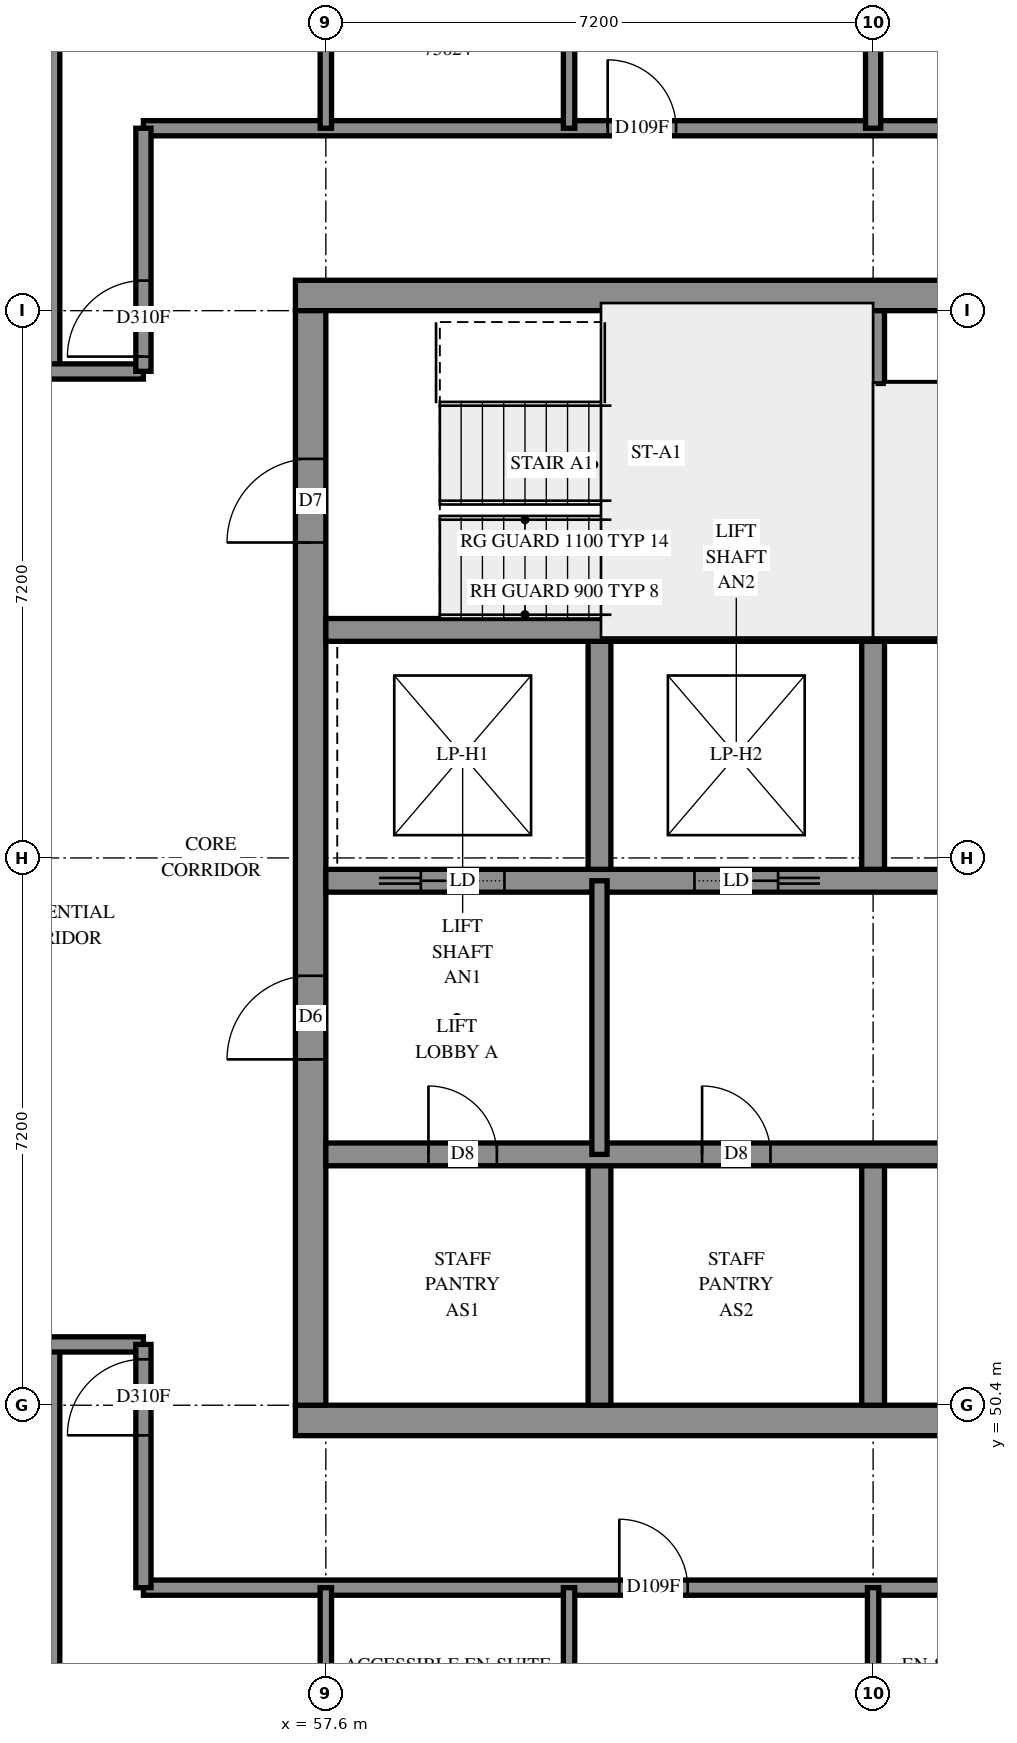
"""IFC4 building model, lengths in metres.
Left out: names, types, materials, properties, quantities, classifications, styles, units other than length and angle.
Written with IfcOpenShell. Run it as: python <this file> out.ifc"""

import sys

from ifc_helpers import new_model, si_unit, direction, frame, frame_2d, origin, place, context, subcontext, project, spatial, rectangle, extrude, element, fill, save


model = new_model("IFC4")
c1 = context("Model", 3, precision=1e-05, world=origin(), true_north=direction((0.0, 1.0)))
c2 = subcontext(c1, "Body", "Model", "MODEL_VIEW")
j1 = project(units=[si_unit("LENGTHUNIT", "METRE"), si_unit("PLANEANGLEUNIT", "RADIAN")], contexts=[c1])
p1 = place(None, origin())
s1 = spatial("IfcSite", under=j1, at=p1, CompositionType="ELEMENT")
p2 = place(p1, origin())
s2 = spatial("IfcBuilding", under=s1, at=p2, CompositionType="ELEMENT")
p3 = place(p2, frame((0.0, 0.0, 274.4)))
s3 = spatial("IfcBuildingStorey", under=s2, at=p3, CompositionType="ELEMENT", Elevation=274.4)
p4 = place(p3, frame((57.2, 50.2, -0.3), z_axis=(0.0, 0.0, 1.0), x_axis=(1.0, 0.0, 0.0)))
e1 = element("IfcWall", 1, at=p4, inside=s3, PredefinedType="SHEAR", context=c2, shape_type="SweptSolid", body=[
    extrude(rectangle(XDim=15.2, YDim=0.4, at=frame_2d((7.6, 0.0))), origin(), (0.0, 0.0, 1.0), 2.7),
])
p5 = place(p3, frame((57.2, 65.0, -0.3), z_axis=(0.0, 0.0, 1.0), x_axis=(1.0, 0.0, 0.0)))
e2 = element("IfcWall", 2, at=p5, inside=s3, PredefinedType="SHEAR", context=c2, shape_type="SweptSolid", body=[
    extrude(rectangle(XDim=15.2, YDim=0.4, at=frame_2d((7.6, 0.0))), origin(), (0.0, 0.0, 1.0), 2.7),
])
p6 = place(p5, frame((10.4, 0.0, 0.3)))
e3 = element("IfcOpeningElement", 3, at=p6, cuts=e2, PredefinedType="OPENING", context=c2, shape_type="SweptSolid", body=[
    extrude(rectangle(XDim=0.8, YDim=2.1, at=frame_2d((0.4, 1.05))), frame((0.0, 0.21, 0.0), z_axis=(0.0, -1.0, 0.0), x_axis=(1.0, 0.0, 0.0)), (0.0, 0.0, 1.0), 0.42),
])
p7 = place(p3, frame((57.4, 50.4, -0.3), z_axis=(0.0, 0.0, 1.0), x_axis=(0.0, 1.0, 0.0)))
e4 = element("IfcWall", 4, at=p7, inside=s3, PredefinedType="SHEAR", context=c2, shape_type="SweptSolid", body=[
    extrude(rectangle(XDim=14.4, YDim=0.4, at=frame_2d((7.2, 0.0))), origin(), (0.0, 0.0, 1.0), 2.7),
])
p8 = place(p7, frame((4.55, 0.0, 0.3)))
e5 = element("IfcOpeningElement", 5, at=p8, cuts=e4, PredefinedType="OPENING", context=c2, shape_type="SweptSolid", body=[
    extrude(rectangle(XDim=1.1, YDim=2.1, at=frame_2d((0.55, 1.05))), frame((0.0, 0.21, 0.0), z_axis=(0.0, -1.0, 0.0), x_axis=(1.0, 0.0, 0.0)), (0.0, 0.0, 1.0), 0.42),
])
p9 = place(p7, frame((11.35, 0.0, 0.3)))
e6 = element("IfcOpeningElement", 6, at=p9, cuts=e4, PredefinedType="OPENING", context=c2, shape_type="SweptSolid", body=[
    extrude(rectangle(XDim=1.1, YDim=2.1, at=frame_2d((0.55, 1.05))), frame((0.0, 0.21, 0.0), z_axis=(0.0, -1.0, 0.0), x_axis=(1.0, 0.0, 0.0)), (0.0, 0.0, 1.0), 0.42),
])
for number, where, z_axis, x_axis in (
    (7, (61.2, 50.4, 0.0), (0.0, 0.0, 1.0), (0.0, 1.0, 0.0)),
    (8, (61.2, 57.3, 0.0), (0.0, 0.0, 1.0), (0.0, 1.0, 0.0)),
    (9, (64.8, 50.4, 0.0), (0.0, 0.0, 1.0), (0.0, 1.0, 0.0)),
    (10, (64.8, 57.3, 0.0), (0.0, 0.0, 1.0), (0.0, 1.0, 0.0)),
):
    element("IfcWall", number, at=place(p3, frame(where, z_axis=z_axis, x_axis=x_axis)), inside=s3, PredefinedType="SOLIDWALL", context=c2, shape_type="SweptSolid", body=[
        extrude(rectangle(XDim=3.3, YDim=0.3, at=frame_2d((1.65, 0.0))), origin(), (0.0, 0.0, 1.0), 3.1),
    ])
p10 = place(p3, frame((57.6, 53.7, 0.0), z_axis=(0.0, 0.0, 1.0), x_axis=(1.0, 0.0, 0.0)))
e11 = element("IfcWall", 11, at=p10, inside=s3, PredefinedType="SOLIDWALL", context=c2, shape_type="SweptSolid", body=[
    extrude(rectangle(XDim=14.4, YDim=0.3, at=frame_2d((7.2, 0.0))), origin(), (0.0, 0.0, 1.0), 3.1),
])
p11 = place(p10, frame((1.35, 0.0, 0.0)))
e12 = element("IfcOpeningElement", 12, at=p11, cuts=e11, PredefinedType="OPENING", context=c2, shape_type="SweptSolid", body=[
    extrude(rectangle(XDim=0.9, YDim=2.1, at=frame_2d((0.45, 1.05))), frame((0.0, 0.16, 0.0), z_axis=(0.0, -1.0, 0.0), x_axis=(1.0, 0.0, 0.0)), (0.0, 0.0, 1.0), 0.32),
])
p12 = place(p10, frame((4.95, 0.0, 0.0)))
e13 = element("IfcOpeningElement", 13, at=p12, cuts=e11, PredefinedType="OPENING", context=c2, shape_type="SweptSolid", body=[
    extrude(rectangle(XDim=0.9, YDim=2.1, at=frame_2d((0.45, 1.05))), frame((0.0, 0.16, 0.0), z_axis=(0.0, -1.0, 0.0), x_axis=(1.0, 0.0, 0.0)), (0.0, 0.0, 1.0), 0.32),
])
p13 = place(p10, frame((8.55, 0.0, 0.0)))
e14 = element("IfcOpeningElement", 14, at=p13, cuts=e11, PredefinedType="OPENING", context=c2, shape_type="SweptSolid", body=[
    extrude(rectangle(XDim=0.9, YDim=2.1, at=frame_2d((0.45, 1.05))), frame((0.0, 0.16, 0.0), z_axis=(0.0, -1.0, 0.0), x_axis=(1.0, 0.0, 0.0)), (0.0, 0.0, 1.0), 0.32),
])
p14 = place(p10, frame((12.05, 0.0, 0.0)))
e15 = element("IfcOpeningElement", 15, at=p14, cuts=e11, PredefinedType="OPENING", context=c2, shape_type="SweptSolid", body=[
    extrude(rectangle(XDim=1.1, YDim=2.1, at=frame_2d((0.55, 1.05))), frame((0.0, 0.16, 0.0), z_axis=(0.0, -1.0, 0.0), x_axis=(1.0, 0.0, 0.0)), (0.0, 0.0, 1.0), 0.32),
])
p15 = place(p3, frame((57.6, 57.3, 0.0), z_axis=(0.0, 0.0, 1.0), x_axis=(1.0, 0.0, 0.0)))
e16 = element("IfcWall", 16, at=p15, inside=s3, PredefinedType="SOLIDWALL", context=c2, shape_type="SweptSolid", body=[
    extrude(rectangle(XDim=14.4, YDim=0.3, at=frame_2d((7.2, 0.0))), origin(), (0.0, 0.0, 1.0), 3.1),
])
p16 = place(p15, frame((8.55, 0.0, 0.0)))
e17 = element("IfcOpeningElement", 17, at=p16, cuts=e16, PredefinedType="OPENING", context=c2, shape_type="SweptSolid", body=[
    extrude(rectangle(XDim=0.9, YDim=2.1, at=frame_2d((0.45, 1.05))), frame((0.0, 0.16, 0.0), z_axis=(0.0, -1.0, 0.0), x_axis=(1.0, 0.0, 0.0)), (0.0, 0.0, 1.0), 0.32),
])
p17 = place(p15, frame((1.25, 0.0, 0.0)))
e18 = element("IfcOpeningElement", 18, at=p17, cuts=e16, PredefinedType="OPENING", context=c2, shape_type="SweptSolid", body=[
    extrude(rectangle(XDim=1.1, YDim=2.1, at=frame_2d((0.55, 1.05))), frame((0.0, 0.16, 0.0), z_axis=(0.0, -1.0, 0.0), x_axis=(1.0, 0.0, 0.0)), (0.0, 0.0, 1.0), 0.32),
])
p18 = place(p15, frame((4.85, 0.0, 0.0)))
e19 = element("IfcOpeningElement", 19, at=p18, cuts=e16, PredefinedType="OPENING", context=c2, shape_type="SweptSolid", body=[
    extrude(rectangle(XDim=1.1, YDim=2.1, at=frame_2d((0.55, 1.05))), frame((0.0, 0.16, 0.0), z_axis=(0.0, -1.0, 0.0), x_axis=(1.0, 0.0, 0.0)), (0.0, 0.0, 1.0), 0.32),
])
p19 = place(p15, frame((12.05, 0.0, 0.0)))
e20 = element("IfcOpeningElement", 20, at=p19, cuts=e16, PredefinedType="OPENING", context=c2, shape_type="SweptSolid", body=[
    extrude(rectangle(XDim=1.1, YDim=2.1, at=frame_2d((0.55, 1.05))), frame((0.0, 0.16, 0.0), z_axis=(0.0, -1.0, 0.0), x_axis=(1.0, 0.0, 0.0)), (0.0, 0.0, 1.0), 0.32),
])
for number, where, z_axis, x_axis in (
    (21, (57.6, 60.6, 0.0), (0.0, 0.0, 1.0), (1.0, 0.0, 0.0)),
    (22, (64.8, 60.6, 0.0), (0.0, 0.0, 1.0), (1.0, 0.0, 0.0)),
):
    element("IfcWall", number, at=place(p3, frame(where, z_axis=z_axis, x_axis=x_axis)), inside=s3, PredefinedType="SOLIDWALL", context=c2, shape_type="SweptSolid", body=[
        extrude(rectangle(XDim=7.2, YDim=0.3, at=frame_2d((3.6, 0.0))), origin(), (0.0, 0.0, 1.0), 3.1),
    ])
p20 = place(p3, frame((64.8, 60.6, 0.0), z_axis=(0.0, 0.0, 1.0), x_axis=(0.0, 1.0, 0.0)))
e23 = element("IfcWall", 23, at=p20, inside=s3, PredefinedType="SOLIDWALL", context=c2, shape_type="SweptSolid", body=[
    extrude(rectangle(XDim=4.2, YDim=0.3, at=frame_2d((2.1, 0.0))), origin(), (0.0, 0.0, 1.0), 3.1),
])
p21 = place(p3, frame((64.95, 63.78, 0.0), z_axis=(0.0, 0.0, 1.0), x_axis=(1.0, 0.0, 0.0)))
e24 = element("IfcWall", 24, at=p21, inside=s3, PredefinedType="PARTITIONING", context=c2, shape_type="SweptSolid", body=[
    extrude(rectangle(XDim=6.25, YDim=0.15, at=frame_2d((3.125, 0.0))), origin(), (0.0, 0.0, 1.0), 3.1),
])
p22 = place(p3, frame((61.2, 53.7, 0.0), z_axis=(0.0, 0.0, 1.0), x_axis=(0.0, 1.0, 0.0)))
e25 = element("IfcWall", 25, at=p22, inside=s3, PredefinedType="PARTITIONING", context=c2, shape_type="SweptSolid", body=[
    extrude(rectangle(XDim=3.6, YDim=0.2, at=frame_2d((1.8, 0.0))), origin(), (0.0, 0.0, 1.0), 3.1),
])
p23 = place(p3, frame((55.2, 67.2, 0.0), z_axis=(0.0, 0.0, 1.0), x_axis=(1.0, 0.0, 0.0)))
e26 = element("IfcWall", 26, at=p23, inside=s3, PredefinedType="PARTITIONING", context=c2, shape_type="SweptSolid", body=[
    extrude(rectangle(XDim=19.2, YDim=0.2, at=frame_2d((9.6, 0.0))), origin(), (0.0, 0.0, 1.0), 3.1),
])
p24 = place(p23, frame((6.108, 0.0, 0.0)))
e27 = element("IfcOpeningElement", 27, at=p24, cuts=e26, PredefinedType="OPENING", context=c2, shape_type="SweptSolid", body=[
    extrude(rectangle(XDim=0.9, YDim=2.1, at=frame_2d((0.45, 1.05))), frame((0.0, 0.11, 0.0), z_axis=(0.0, -1.0, 0.0), x_axis=(1.0, 0.0, 0.0)), (0.0, 0.0, 1.0), 0.22),
])
p25 = place(p23, frame((11.675, 0.0, 0.0)))
e28 = element("IfcOpeningElement", 28, at=p25, cuts=e26, PredefinedType="OPENING", context=c2, shape_type="SweptSolid", body=[
    extrude(rectangle(XDim=1.0, YDim=2.1, at=frame_2d((0.5, 1.05))), frame((0.0, 0.11, 0.0), z_axis=(0.0, -1.0, 0.0), x_axis=(1.0, 0.0, 0.0)), (0.0, 0.0, 1.0), 0.22),
])
p26 = place(p23, frame((13.725, 0.0, 0.0)))
e29 = element("IfcOpeningElement", 29, at=p26, cuts=e26, PredefinedType="OPENING", context=c2, shape_type="SweptSolid", body=[
    extrude(rectangle(XDim=1.0, YDim=2.1, at=frame_2d((0.5, 1.05))), frame((0.0, 0.11, 0.0), z_axis=(0.0, -1.0, 0.0), x_axis=(1.0, 0.0, 0.0)), (0.0, 0.0, 1.0), 0.22),
])
p27 = place(p3, frame((55.2, 48.0, 0.0), z_axis=(0.0, 0.0, 1.0), x_axis=(1.0, 0.0, 0.0)))
e30 = element("IfcWall", 30, at=p27, inside=s3, PredefinedType="PARTITIONING", context=c2, shape_type="SweptSolid", body=[
    extrude(rectangle(XDim=19.15, YDim=0.2, at=frame_2d((9.575, 0.0))), origin(), (0.0, 0.0, 1.0), 3.1),
])
p28 = place(p27, frame((6.261, 0.0, 0.0)))
e31 = element("IfcOpeningElement", 31, at=p28, cuts=e30, PredefinedType="OPENING", context=c2, shape_type="SweptSolid", body=[
    extrude(rectangle(XDim=0.9, YDim=2.1, at=frame_2d((0.45, 1.05))), frame((0.0, 0.11, 0.0), z_axis=(0.0, -1.0, 0.0), x_axis=(1.0, 0.0, 0.0)), (0.0, 0.0, 1.0), 0.22),
])
p29 = place(p27, frame((13.499, 0.0, 0.0)))
e32 = element("IfcOpeningElement", 32, at=p29, cuts=e30, PredefinedType="OPENING", context=c2, shape_type="SweptSolid", body=[
    extrude(rectangle(XDim=0.9, YDim=2.1, at=frame_2d((0.45, 1.05))), frame((0.0, 0.11, 0.0), z_axis=(0.0, -1.0, 0.0), x_axis=(1.0, 0.0, 0.0)), (0.0, 0.0, 1.0), 0.22),
])
p30 = place(p3, frame((54.0, 42.268, 0.0), z_axis=(0.0, 0.0, 1.0), x_axis=(0.0, 1.0, 0.0)))
e33 = element("IfcWall", 33, at=p30, inside=s3, PredefinedType="PARTITIONING", context=c2, shape_type="SweptSolid", body=[
    extrude(rectangle(XDim=8.932, YDim=0.2, at=frame_2d((4.466, 0.0))), origin(), (0.0, 0.0, 1.0), 3.1),
])
p31 = place(p3, frame((54.0, 64.0, 0.0), z_axis=(0.0, 0.0, 1.0), x_axis=(0.0, 1.0, 0.0)))
e34 = element("IfcWall", 34, at=p31, inside=s3, PredefinedType="PARTITIONING", context=c2, shape_type="SweptSolid", body=[
    extrude(rectangle(XDim=8.848, YDim=0.2, at=frame_2d((4.424, 0.0))), origin(), (0.0, 0.0, 1.0), 3.1),
])
p32 = place(p3, frame((50.4, 51.2, 0.0), z_axis=(0.0, 0.0, 1.0), x_axis=(1.0, 0.0, 0.0)))
e35 = element("IfcWall", 35, at=p32, inside=s3, PredefinedType="PARTITIONING", context=c2, shape_type="SweptSolid", body=[
    extrude(rectangle(XDim=4.8, YDim=0.2, at=frame_2d((2.4, 0.0))), origin(), (0.0, 0.0, 1.0), 3.1),
])
p33 = place(p32, frame((2.075, 0.0, 0.0)))
e36 = element("IfcOpeningElement", 36, at=p33, cuts=e35, PredefinedType="OPENING", context=c2, shape_type="SweptSolid", body=[
    extrude(rectangle(XDim=1.0, YDim=2.1, at=frame_2d((0.5, 1.05))), frame((0.0, 0.11, 0.0), z_axis=(0.0, -1.0, 0.0), x_axis=(1.0, 0.0, 0.0)), (0.0, 0.0, 1.0), 0.22),
])
p34 = place(p3, frame((50.4, 64.0, 0.0), z_axis=(0.0, 0.0, 1.0), x_axis=(1.0, 0.0, 0.0)))
e37 = element("IfcWall", 37, at=p34, inside=s3, PredefinedType="PARTITIONING", context=c2, shape_type="SweptSolid", body=[
    extrude(rectangle(XDim=4.8, YDim=0.2, at=frame_2d((2.4, 0.0))), origin(), (0.0, 0.0, 1.0), 3.1),
])
p35 = place(p34, frame((2.033, 0.0, 0.0)))
e38 = element("IfcOpeningElement", 38, at=p35, cuts=e37, PredefinedType="OPENING", context=c2, shape_type="SweptSolid", body=[
    extrude(rectangle(XDim=1.0, YDim=2.1, at=frame_2d((0.5, 1.05))), frame((0.0, 0.11, 0.0), z_axis=(0.0, -1.0, 0.0), x_axis=(1.0, 0.0, 0.0)), (0.0, 0.0, 1.0), 0.22),
])
p36 = place(p3, frame((64.8, 67.2, 0.0), z_axis=(0.0, 0.0, 1.0), x_axis=(0.0, 1.0, 0.0)))
e39 = element("IfcWall", 39, at=p36, inside=s3, PredefinedType="PARTITIONING", context=c2, shape_type="SweptSolid", body=[
    extrude(rectangle(XDim=4.45, YDim=0.2, at=frame_2d((2.225, 0.0))), origin(), (0.0, 0.0, 1.0), 3.1),
])
p37 = place(p3, frame((55.2, 48.0, 0.0), z_axis=(0.0, 0.0, 1.0), x_axis=(0.0, 1.0, 0.0)))
e40 = element("IfcWall", 40, at=p37, inside=s3, PredefinedType="PARTITIONING", context=c2, shape_type="SweptSolid", body=[
    extrude(rectangle(XDim=3.2, YDim=0.2, at=frame_2d((1.6, 0.0))), origin(), (0.0, 0.0, 1.0), 3.1),
])
p38 = place(p37, frame((2.004, 0.0, 0.0)))
e41 = element("IfcOpeningElement", 41, at=p38, cuts=e40, PredefinedType="OPENING", context=c2, shape_type="SweptSolid", body=[
    extrude(rectangle(XDim=1.0, YDim=2.1, at=frame_2d((0.5, 1.05))), frame((0.0, 0.11, 0.0), z_axis=(0.0, -1.0, 0.0), x_axis=(1.0, 0.0, 0.0)), (0.0, 0.0, 1.0), 0.22),
])
p39 = place(p3, frame((55.2, 64.002, 0.0), z_axis=(0.0, 0.0, 1.0), x_axis=(0.0, 1.0, 0.0)))
e42 = element("IfcWall", 42, at=p39, inside=s3, PredefinedType="PARTITIONING", context=c2, shape_type="SweptSolid", body=[
    extrude(rectangle(XDim=3.198, YDim=0.2, at=frame_2d((1.599, 0.0))), origin(), (0.0, 0.0, 1.0), 3.1),
])
p40 = place(p39, frame((0.194, 0.0, 0.0)))
e43 = element("IfcOpeningElement", 43, at=p40, cuts=e42, PredefinedType="OPENING", context=c2, shape_type="SweptSolid", body=[
    extrude(rectangle(XDim=1.0, YDim=2.1, at=frame_2d((0.5, 1.05))), frame((0.0, 0.11, 0.0), z_axis=(0.0, -1.0, 0.0), x_axis=(1.0, 0.0, 0.0)), (0.0, 0.0, 1.0), 0.22),
])
for number, where, z_axis, x_axis in (
    (44, (60.8, 45.6, 0.0), (0.0, 0.0, 1.0), (0.0, 1.0, 0.0)),
    (45, (57.6, 45.6, 0.0), (0.0, 0.0, 1.0), (0.0, 1.0, 0.0)),
    (46, (64.8, 45.6, 0.0), (0.0, 0.0, 1.0), (0.0, 1.0, 0.0)),
    (47, (60.8, 67.2, 0.0), (0.0, 0.0, 1.0), (0.0, 1.0, 0.0)),
    (48, (57.6, 67.2, 0.0), (0.0, 0.0, 1.0), (0.0, 1.0, 0.0)),
):
    element("IfcWall", number, at=place(p3, frame(where, z_axis=z_axis, x_axis=x_axis)), inside=s3, PredefinedType="PARTITIONING", context=c2, shape_type="SweptSolid", body=[
        extrude(rectangle(XDim=2.4, YDim=0.15, at=frame_2d((1.2, 0.0))), origin(), (0.0, 0.0, 1.0), 3.1),
    ])
p41 = place(p8, origin())
e49 = element("IfcDoor", 49, at=p41, inside=s3, OperationType="DOUBLE_DOOR_SINGLE_SWING", PredefinedType="DOOR", context=c2, shape_type="SweptSolid", body=[
    extrude(rectangle(XDim=1.1, YDim=2.1, at=frame_2d((0.55, 1.05))), frame((0.0, 0.025, 0.0), z_axis=(0.0, -1.0, 0.0), x_axis=(1.0, 0.0, 0.0)), (0.0, 0.0, 1.0), 0.05),
])
fill(e5, e49)
p42 = place(p9, origin())
e50 = element("IfcDoor", 50, at=p42, inside=s3, OperationType="SINGLE_SWING_LEFT", PredefinedType="DOOR", context=c2, shape_type="SweptSolid", body=[
    extrude(rectangle(XDim=1.1, YDim=2.1, at=frame_2d((0.55, 1.05))), frame((0.0, 0.025, 0.0), z_axis=(0.0, -1.0, 0.0), x_axis=(1.0, 0.0, 0.0)), (0.0, 0.0, 1.0), 0.05),
])
fill(e6, e50)
p43 = place(p11, origin())
e51 = element("IfcDoor", 51, at=p43, inside=s3, OperationType="SINGLE_SWING_LEFT", PredefinedType="DOOR", context=c2, shape_type="SweptSolid", body=[
    extrude(rectangle(XDim=0.9, YDim=2.1, at=frame_2d((0.45, 1.05))), frame((0.0, 0.025, 0.0), z_axis=(0.0, -1.0, 0.0), x_axis=(1.0, 0.0, 0.0)), (0.0, 0.0, 1.0), 0.05),
])
fill(e12, e51)
p44 = place(p12, origin())
e52 = element("IfcDoor", 52, at=p44, inside=s3, OperationType="SINGLE_SWING_LEFT", PredefinedType="DOOR", context=c2, shape_type="SweptSolid", body=[
    extrude(rectangle(XDim=0.9, YDim=2.1, at=frame_2d((0.45, 1.05))), frame((0.0, 0.025, 0.0), z_axis=(0.0, -1.0, 0.0), x_axis=(1.0, 0.0, 0.0)), (0.0, 0.0, 1.0), 0.05),
])
fill(e13, e52)
p45 = place(p17, origin())
e53 = element("IfcDoor", 53, at=p45, inside=s3, OperationType="SLIDING_TO_LEFT", PredefinedType="DOOR", context=c2, shape_type="SweptSolid", body=[
    extrude(rectangle(XDim=1.1, YDim=2.1, at=frame_2d((0.55, 1.05))), frame((0.0, 0.025, 0.0), z_axis=(0.0, -1.0, 0.0), x_axis=(1.0, 0.0, 0.0)), (0.0, 0.0, 1.0), 0.05),
])
fill(e18, e53)
p46 = place(p18, origin())
e54 = element("IfcDoor", 54, at=p46, inside=s3, OperationType="SLIDING_TO_RIGHT", PredefinedType="DOOR", context=c2, shape_type="SweptSolid", body=[
    extrude(rectangle(XDim=1.1, YDim=2.1, at=frame_2d((0.55, 1.05))), frame((0.0, 0.025, 0.0), z_axis=(0.0, -1.0, 0.0), x_axis=(1.0, 0.0, 0.0)), (0.0, 0.0, 1.0), 0.05),
])
fill(e19, e54)
p47 = place(p40, origin())
e55 = element("IfcDoor", 55, at=p47, inside=s3, OperationType="SINGLE_SWING_LEFT", PredefinedType="DOOR", context=c2, shape_type="SweptSolid", body=[
    extrude(rectangle(XDim=1.0, YDim=2.1, at=frame_2d((0.5, 1.05))), frame((0.0, 0.025, 0.0), z_axis=(0.0, -1.0, 0.0), x_axis=(1.0, 0.0, 0.0)), (0.0, 0.0, 1.0), 0.05),
])
fill(e43, e55)
p48 = place(p24, origin())
e56 = element("IfcDoor", 56, at=p48, inside=s3, OperationType="SINGLE_SWING_RIGHT", PredefinedType="DOOR", context=c2, shape_type="SweptSolid", body=[
    extrude(rectangle(XDim=0.9, YDim=2.1, at=frame_2d((0.45, 1.05))), frame((0.0, 0.025, 0.0), z_axis=(0.0, -1.0, 0.0), x_axis=(1.0, 0.0, 0.0)), (0.0, 0.0, 1.0), 0.05),
])
fill(e27, e56)
p49 = place(p38, origin())
e57 = element("IfcDoor", 57, at=p49, inside=s3, OperationType="SINGLE_SWING_RIGHT", PredefinedType="DOOR", context=c2, shape_type="SweptSolid", body=[
    extrude(rectangle(XDim=1.0, YDim=2.1, at=frame_2d((0.5, 1.05))), frame((0.0, 0.025, 0.0), z_axis=(0.0, -1.0, 0.0), x_axis=(1.0, 0.0, 0.0)), (0.0, 0.0, 1.0), 0.05),
])
fill(e41, e57)
p50 = place(p28, origin())
e58 = element("IfcDoor", 58, at=p50, inside=s3, OperationType="SINGLE_SWING_LEFT", PredefinedType="DOOR", context=c2, shape_type="SweptSolid", body=[
    extrude(rectangle(XDim=0.9, YDim=2.1, at=frame_2d((0.45, 1.05))), frame((0.0, 0.025, 0.0), z_axis=(0.0, -1.0, 0.0), x_axis=(1.0, 0.0, 0.0)), (0.0, 0.0, 1.0), 0.05),
])
fill(e31, e58)
save(model, sys.argv[1])
